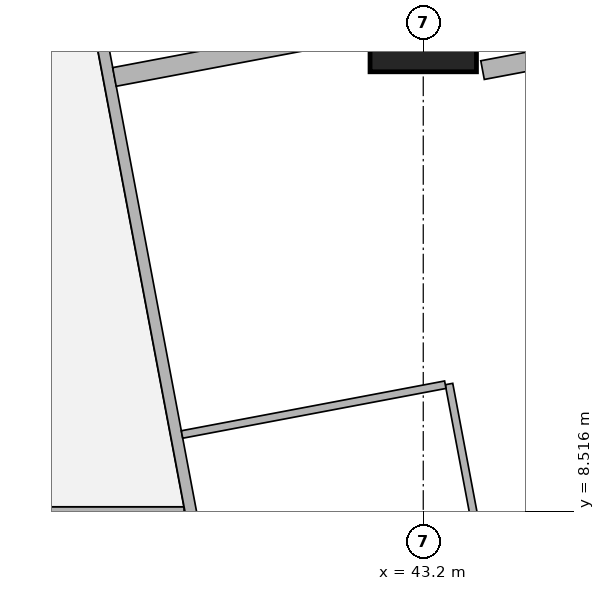
"""IFC4 building model, lengths in metres.
Left out: names, types, materials, properties, quantities, classifications, styles, units other than length and angle.
Written with IfcOpenShell. Run it as: python <this file> out.ifc"""

import sys

from ifc_helpers import new_model, si_unit, direction, frame, frame_2d, origin, origin_2d, place, context, subcontext, project, spatial, rectangle, extrude, element, fill, save


model = new_model("IFC4")
c1 = context("Model", 3, precision=1e-05, world=origin(), true_north=direction((0.0, 1.0)))
c2 = subcontext(c1, "Body", "Model", "MODEL_VIEW")
j1 = project(units=[si_unit("LENGTHUNIT", "METRE"), si_unit("PLANEANGLEUNIT", "RADIAN")], contexts=[c1])
p1 = place(None, origin())
s1 = spatial("IfcSite", under=j1, at=p1, CompositionType="ELEMENT")
p2 = place(p1, origin())
s2 = spatial("IfcBuilding", under=s1, at=p2, CompositionType="ELEMENT")
p3 = place(p2, frame((0.0, 0.0, 204.95)))
s3 = spatial("IfcBuildingStorey", under=s2, at=p3, CompositionType="ELEMENT", Elevation=204.95)
p4 = place(p3, frame((43.2, 15.0, 0.0), z_axis=(0.0, 0.0, 1.0), x_axis=(1.0, 0.0, 0.0)))
e1 = element("IfcColumn", 1, at=p4, inside=s3, PredefinedType="COLUMN", context=c2, shape_type="SweptSolid", body=[
    extrude(rectangle(XDim=1.4, YDim=1.4, at=origin_2d()), origin(), (0.0, 0.0, 1.0), 3.75),
])
p5 = place(p3, frame((50.653, 2.703, 0.0), z_axis=(0.0, 0.0, 1.0), x_axis=(-0.185612026696, 0.982623109613, 0.0)))
e2 = element("IfcWall", 2, at=p5, inside=s3, PredefinedType="SOLIDWALL", context=c2, shape_type="SweptSolid", body=[
    extrude(rectangle(XDim=41.393, YDim=0.2, at=frame_2d((20.697, 0.0))), origin(), (0.0, 0.0, 1.0), 3.5),
])
p6 = place(p5, frame((1.633, 0.0, 0.9)))
e3 = element("IfcOpeningElement", 3, at=p6, cuts=e2, PredefinedType="OPENING", context=c2, shape_type="SweptSolid", body=[
    extrude(rectangle(XDim=1.8, YDim=1.5, at=frame_2d((0.9, 0.75))), frame((0.0, 0.11, 0.0), z_axis=(0.0, -1.0, 0.0), x_axis=(1.0, 0.0, 0.0)), (0.0, 0.0, 1.0), 0.22),
])
p7 = place(p5, frame((6.032, 0.0, 0.9)))
e4 = element("IfcOpeningElement", 4, at=p7, cuts=e2, PredefinedType="OPENING", context=c2, shape_type="SweptSolid", body=[
    extrude(rectangle(XDim=1.8, YDim=1.5, at=frame_2d((0.9, 0.75))), frame((0.0, 0.11, 0.0), z_axis=(0.0, -1.0, 0.0), x_axis=(1.0, 0.0, 0.0)), (0.0, 0.0, 1.0), 0.22),
])
p8 = place(p5, frame((9.848, 0.0, 0.9)))
e5 = element("IfcOpeningElement", 5, at=p8, cuts=e2, PredefinedType="OPENING", context=c2, shape_type="SweptSolid", body=[
    extrude(rectangle(XDim=1.8, YDim=1.5, at=frame_2d((0.9, 0.75))), frame((0.0, 0.11, 0.0), z_axis=(0.0, -1.0, 0.0), x_axis=(1.0, 0.0, 0.0)), (0.0, 0.0, 1.0), 0.22),
])
p9 = place(p5, frame((13.664, 0.0, 0.9)))
e6 = element("IfcOpeningElement", 6, at=p9, cuts=e2, PredefinedType="OPENING", context=c2, shape_type="SweptSolid", body=[
    extrude(rectangle(XDim=1.8, YDim=1.5, at=frame_2d((0.9, 0.75))), frame((0.0, 0.11, 0.0), z_axis=(0.0, -1.0, 0.0), x_axis=(1.0, 0.0, 0.0)), (0.0, 0.0, 1.0), 0.22),
])
p10 = place(p5, frame((17.481, 0.0, 0.9)))
e7 = element("IfcOpeningElement", 7, at=p10, cuts=e2, PredefinedType="OPENING", context=c2, shape_type="SweptSolid", body=[
    extrude(rectangle(XDim=1.8, YDim=1.5, at=frame_2d((0.9, 0.75))), frame((0.0, 0.11, 0.0), z_axis=(0.0, -1.0, 0.0), x_axis=(1.0, 0.0, 0.0)), (0.0, 0.0, 1.0), 0.22),
])
p11 = place(p5, frame((21.297, 0.0, 0.9)))
e8 = element("IfcOpeningElement", 8, at=p11, cuts=e2, PredefinedType="OPENING", context=c2, shape_type="SweptSolid", body=[
    extrude(rectangle(XDim=1.8, YDim=1.5, at=frame_2d((0.9, 0.75))), frame((0.0, 0.11, 0.0), z_axis=(0.0, -1.0, 0.0), x_axis=(1.0, 0.0, 0.0)), (0.0, 0.0, 1.0), 0.22),
])
p12 = place(p5, frame((25.113, 0.0, 0.9)))
e9 = element("IfcOpeningElement", 9, at=p12, cuts=e2, PredefinedType="OPENING", context=c2, shape_type="SweptSolid", body=[
    extrude(rectangle(XDim=1.8, YDim=1.5, at=frame_2d((0.9, 0.75))), frame((0.0, 0.11, 0.0), z_axis=(0.0, -1.0, 0.0), x_axis=(1.0, 0.0, 0.0)), (0.0, 0.0, 1.0), 0.22),
])
p13 = place(p5, frame((28.93, 0.0, 0.9)))
e10 = element("IfcOpeningElement", 10, at=p13, cuts=e2, PredefinedType="OPENING", context=c2, shape_type="SweptSolid", body=[
    extrude(rectangle(XDim=1.8, YDim=1.5, at=frame_2d((0.9, 0.75))), frame((0.0, 0.11, 0.0), z_axis=(0.0, -1.0, 0.0), x_axis=(1.0, 0.0, 0.0)), (0.0, 0.0, 1.0), 0.22),
])
p14 = place(p5, frame((32.746, 0.0, 0.9)))
e11 = element("IfcOpeningElement", 11, at=p14, cuts=e2, PredefinedType="OPENING", context=c2, shape_type="SweptSolid", body=[
    extrude(rectangle(XDim=1.8, YDim=1.5, at=frame_2d((0.9, 0.75))), frame((0.0, 0.11, 0.0), z_axis=(0.0, -1.0, 0.0), x_axis=(1.0, 0.0, 0.0)), (0.0, 0.0, 1.0), 0.22),
])
p15 = place(p5, frame((36.481, 0.0, 0.9)))
e12 = element("IfcOpeningElement", 12, at=p15, cuts=e2, PredefinedType="OPENING", context=c2, shape_type="SweptSolid", body=[
    extrude(rectangle(XDim=1.8, YDim=1.5, at=frame_2d((0.9, 0.75))), frame((0.0, 0.11, 0.0), z_axis=(0.0, -1.0, 0.0), x_axis=(1.0, 0.0, 0.0)), (0.0, 0.0, 1.0), 0.22),
])
p16 = place(p3, frame((40.053, 8.5, 0.0), z_axis=(0.0, 0.0, 1.0), x_axis=(-1.0, 0.0, 0.0)))
e13 = element("IfcWall", 13, at=p16, inside=s3, PredefinedType="SOLIDWALL", context=c2, shape_type="SweptSolid", body=[
    extrude(rectangle(XDim=31.052, YDim=0.15, at=frame_2d((15.526, 0.0))), origin(), (0.0, 0.0, 1.0), 3.5),
])
p17 = place(p16, frame((29.178, 0.0, 0.0)))
e14 = element("IfcOpeningElement", 14, at=p17, cuts=e13, PredefinedType="OPENING", context=c2, shape_type="SweptSolid", body=[
    extrude(rectangle(XDim=1.0, YDim=2.1, at=frame_2d((0.5, 1.05))), frame((0.0, 0.085, 0.0), z_axis=(0.0, -1.0, 0.0), x_axis=(1.0, 0.0, 0.0)), (0.0, 0.0, 1.0), 0.17),
])
p18 = place(p16, frame((19.953, 0.0, 0.0)))
e15 = element("IfcOpeningElement", 15, at=p18, cuts=e13, PredefinedType="OPENING", context=c2, shape_type="SweptSolid", body=[
    extrude(rectangle(XDim=1.0, YDim=2.1, at=frame_2d((0.5, 1.05))), frame((0.0, 0.085, 0.0), z_axis=(0.0, -1.0, 0.0), x_axis=(1.0, 0.0, 0.0)), (0.0, 0.0, 1.0), 0.17),
])
p19 = place(p16, frame((12.753, 0.0, 0.0)))
e16 = element("IfcOpeningElement", 16, at=p19, cuts=e13, PredefinedType="OPENING", context=c2, shape_type="SweptSolid", body=[
    extrude(rectangle(XDim=1.0, YDim=2.1, at=frame_2d((0.5, 1.05))), frame((0.0, 0.085, 0.0), z_axis=(0.0, -1.0, 0.0), x_axis=(1.0, 0.0, 0.0)), (0.0, 0.0, 1.0), 0.17),
])
p20 = place(p16, frame((0.15, 0.0, 0.0)))
e17 = element("IfcOpeningElement", 17, at=p20, cuts=e13, PredefinedType="OPENING", context=c2, shape_type="SweptSolid", body=[
    extrude(rectangle(XDim=1.0, YDim=2.1, at=frame_2d((0.5, 1.05))), frame((0.0, 0.085, 0.0), z_axis=(0.0, -1.0, 0.0), x_axis=(1.0, 0.0, 0.0)), (0.0, 0.0, 1.0), 0.17),
])
p21 = place(p3, frame((33.68, 42.723, 0.0), z_axis=(0.0, 0.0, 1.0), x_axis=(0.185601160014, -0.982625162207, 0.0)))
e18 = element("IfcWall", 18, at=p21, inside=s3, PredefinedType="SOLIDWALL", context=c2, shape_type="SweptSolid", body=[
    extrude(rectangle(XDim=41.051, YDim=0.15, at=frame_2d((20.526, 0.0))), origin(), (0.0, 0.0, 1.0), 2.5),
])
p22 = place(p21, frame((12.307, 0.0, 0.0)))
e19 = element("IfcOpeningElement", 19, at=p22, cuts=e18, PredefinedType="OPENING", context=c2, shape_type="SweptSolid", body=[
    extrude(rectangle(XDim=1.0, YDim=2.1, at=frame_2d((0.5, 1.05))), frame((0.0, 0.085, 0.0), z_axis=(0.0, -1.0, 0.0), x_axis=(1.0, 0.0, 0.0)), (0.0, 0.0, 1.0), 0.17),
])
p23 = place(p21, frame((16.123, 0.0, 0.0)))
e20 = element("IfcOpeningElement", 20, at=p23, cuts=e18, PredefinedType="OPENING", context=c2, shape_type="SweptSolid", body=[
    extrude(rectangle(XDim=1.0, YDim=2.1, at=frame_2d((0.5, 1.05))), frame((0.0, 0.085, 0.0), z_axis=(0.0, -1.0, 0.0), x_axis=(1.0, 0.0, 0.0)), (0.0, 0.0, 1.0), 0.17),
])
p24 = place(p21, frame((30.902, 0.0, 0.0)))
e21 = element("IfcOpeningElement", 21, at=p24, cuts=e18, PredefinedType="OPENING", context=c2, shape_type="SweptSolid", body=[
    extrude(rectangle(XDim=1.0, YDim=2.1, at=frame_2d((0.5, 1.05))), frame((0.0, 0.085, 0.0), z_axis=(0.0, -1.0, 0.0), x_axis=(1.0, 0.0, 0.0)), (0.0, 0.0, 1.0), 0.17),
])
p25 = place(p3, frame((43.539, 10.192, 0.0), z_axis=(0.0, 0.0, 1.0), x_axis=(0.185443145218, -0.982654995353, 0.0)))
e22 = element("IfcWall", 22, at=p25, inside=s3, PredefinedType="PARTITIONING", context=c2, shape_type="SweptSolid", body=[
    extrude(rectangle(XDim=2.017, YDim=0.1, at=frame_2d((1.008, 0.0))), origin(), (0.0, 0.0, 1.0), 3.5),
])
p26 = place(p3, frame((43.49, 10.183, 0.0), z_axis=(0.0, 0.0, 1.0), x_axis=(-0.982588017646, -0.185797706064, 0.0)))
e23 = element("IfcWall", 23, at=p26, inside=s3, PredefinedType="PARTITIONING", context=c2, shape_type="SweptSolid", body=[
    extrude(rectangle(XDim=3.525, YDim=0.1, at=frame_2d((1.763, 0.0))), origin(), (0.0, 0.0, 1.0), 3.5),
])
p27 = place(p26, frame((1.325, 0.0, 0.0)))
e24 = element("IfcOpeningElement", 24, at=p27, cuts=e23, PredefinedType="OPENING", context=c2, shape_type="SweptSolid", body=[
    extrude(rectangle(XDim=0.9, YDim=2.1, at=frame_2d((0.45, 1.05))), frame((0.0, 0.06, 0.0), z_axis=(0.0, -1.0, 0.0), x_axis=(1.0, 0.0, 0.0)), (0.0, 0.0, 1.0), 0.12),
])
p28 = place(p3, frame((45.09, 14.531, 0.0), z_axis=(0.0, 0.0, 1.0), x_axis=(-0.982737354171, -0.185006196431, 0.0)))
e25 = element("IfcWall", 25, at=p28, inside=s3, PredefinedType="SOLIDWALL", context=c2, shape_type="SweptSolid", body=[
    extrude(rectangle(XDim=1.13, YDim=0.25, at=frame_2d((0.565, 0.0))), origin(), (0.0, 0.0, 1.0), 2.05),
])
p29 = place(p3, frame((42.476, 14.863, 0.0), z_axis=(0.0, 0.0, 1.0), x_axis=(-0.982603567712, -0.185715450942, 0.0)))
e26 = element("IfcWall", 26, at=p29, inside=s3, PredefinedType="SOLIDWALL", context=c2, shape_type="SweptSolid", body=[
    extrude(rectangle(XDim=3.398, YDim=0.25, at=frame_2d((1.699, 0.0))), origin(), (0.0, 0.0, 1.0), 3.5),
])
p30 = place(p20, origin())
e27 = element("IfcDoor", 27, at=p30, inside=s3, OperationType="SINGLE_SWING_LEFT", PredefinedType="DOOR", context=c2, shape_type="SweptSolid", body=[
    extrude(rectangle(XDim=1.0, YDim=2.1, at=frame_2d((0.5, 1.05))), frame((0.0, 0.025, 0.0), z_axis=(0.0, -1.0, 0.0), x_axis=(1.0, 0.0, 0.0)), (0.0, 0.0, 1.0), 0.05),
])
fill(e17, e27)
p31 = place(p24, origin())
e28 = element("IfcDoor", 28, at=p31, inside=s3, OperationType="SINGLE_SWING_LEFT", PredefinedType="DOOR", context=c2, shape_type="SweptSolid", body=[
    extrude(rectangle(XDim=1.0, YDim=2.1, at=frame_2d((0.5, 1.05))), frame((0.0, 0.025, 0.0), z_axis=(0.0, -1.0, 0.0), x_axis=(1.0, 0.0, 0.0)), (0.0, 0.0, 1.0), 0.05),
])
fill(e21, e28)
p32 = place(p27, origin())
e29 = element("IfcDoor", 29, at=p32, inside=s3, OperationType="SINGLE_SWING_LEFT", PredefinedType="DOOR", context=c2, shape_type="SweptSolid", body=[
    extrude(rectangle(XDim=0.9, YDim=2.1, at=frame_2d((0.45, 1.05))), frame((0.0, 0.025, 0.0), z_axis=(0.0, -1.0, 0.0), x_axis=(1.0, 0.0, 0.0)), (0.0, 0.0, 1.0), 0.05),
])
fill(e24, e29)
save(model, sys.argv[1])
